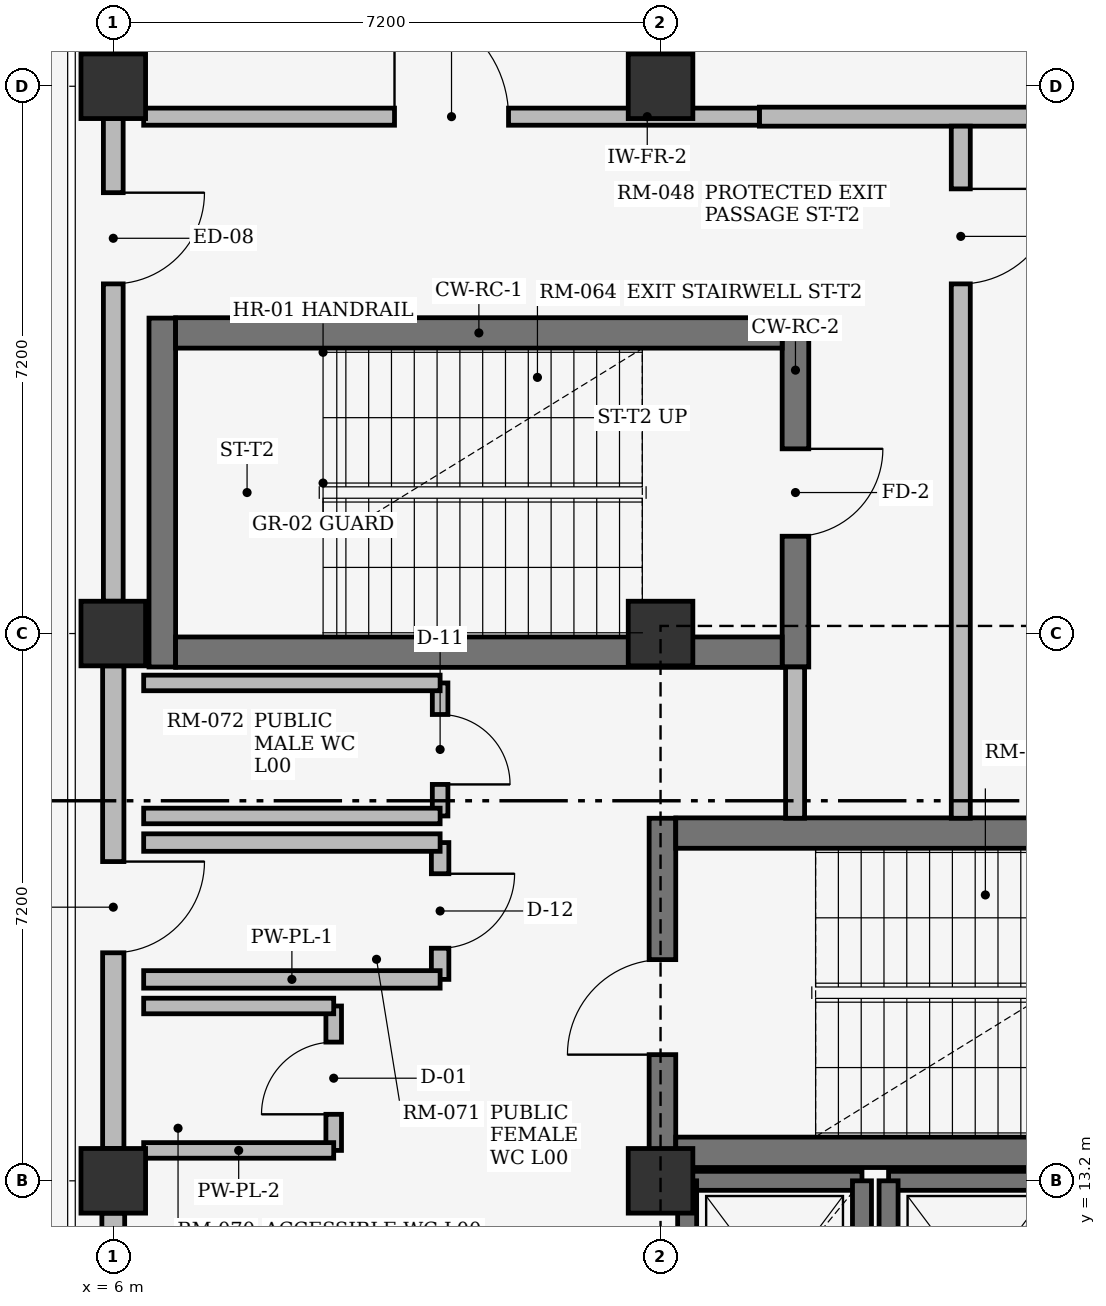
"""IFC4 building model, lengths in metres.
Left out: names, types, materials, properties, quantities, classifications, styles, units other than length and angle.
Written with IfcOpenShell. Run it as: python <this file> out.ifc"""

import sys

from ifc_helpers import new_model, si_unit, direction, frame, frame_2d, origin, origin_2d, place, context, subcontext, project, spatial, rectangle, extrude, element, fill, save


model = new_model("IFC4")
c1 = context("Model", 3, precision=1e-05, world=origin(), true_north=direction((0.0, 1.0)))
c2 = subcontext(c1, "Body", "Model", "MODEL_VIEW")
j1 = project(units=[si_unit("LENGTHUNIT", "METRE"), si_unit("PLANEANGLEUNIT", "RADIAN")], contexts=[c1])
p1 = place(None, origin())
s1 = spatial("IfcSite", under=j1, at=p1, CompositionType="ELEMENT")
p2 = place(p1, origin())
s2 = spatial("IfcBuilding", under=s1, at=p2, CompositionType="ELEMENT")
p3 = place(p2, origin())
s3 = spatial("IfcBuildingStorey", under=s2, at=p3, CompositionType="ELEMENT", Elevation=0.0)
for number, where, z_axis, x_axis in (
    (1, (6.0, 13.2, 0.0), (0.0, 0.0, 1.0), (1.0, 0.0, 0.0)),
    (2, (6.0, 20.4, 0.0), (0.0, 0.0, 1.0), (1.0, 0.0, 0.0)),
    (3, (6.0, 27.6, 0.0), (0.0, 0.0, 1.0), (1.0, 0.0, 0.0)),
    (4, (13.2, 13.2, 0.0), (0.0, 0.0, 1.0), (1.0, 0.0, 0.0)),
    (5, (13.2, 20.4, 0.0), (0.0, 0.0, 1.0), (1.0, 0.0, 0.0)),
    (6, (13.2, 27.6, 0.0), (0.0, 0.0, 1.0), (1.0, 0.0, 0.0)),
):
    element("IfcColumn", number, at=place(p3, frame(where, z_axis=z_axis, x_axis=x_axis)), inside=s3, PredefinedType="COLUMN", context=c2, shape_type="SweptSolid", body=[
        extrude(rectangle(XDim=0.85, YDim=0.85, at=origin_2d()), origin(), (0.0, 0.0, 1.0), 4.48),
    ])
p4 = place(p3, frame((6.0, 6.425, 0.0), z_axis=(0.0, 0.0, 1.0), x_axis=(0.0, 1.0, 0.0)))
e7 = element("IfcWall", 7, at=p4, inside=s3, PredefinedType="STANDARD", context=c2, shape_type="SweptSolid", body=[
    extrude(rectangle(XDim=6.35, YDim=0.3, at=frame_2d((3.175, 0.0))), origin(), (0.0, 0.0, 1.0), 3.66),
])
p5 = place(p4, frame((2.6, 0.0, 0.75)))
e8 = element("IfcOpeningElement", 8, at=p5, cuts=e7, PredefinedType="OPENING", context=c2, shape_type="SweptSolid", body=[
    extrude(rectangle(XDim=1.15, YDim=1.5, at=frame_2d((0.575, 0.75))), frame((0.0, 0.16, 0.0), z_axis=(0.0, -1.0, 0.0), x_axis=(1.0, 0.0, 0.0)), (0.0, 0.0, 1.0), 0.32),
])
p6 = place(p3, frame((6.0, 13.625, 0.0), z_axis=(0.0, 0.0, 1.0), x_axis=(0.0, 1.0, 0.0)))
e9 = element("IfcWall", 9, at=p6, inside=s3, PredefinedType="STANDARD", context=c2, shape_type="SweptSolid", body=[
    extrude(rectangle(XDim=6.35, YDim=0.28, at=frame_2d((3.175, 0.0))), origin(), (0.0, 0.0, 1.0), 3.66),
])
p7 = place(p6, frame((2.575, 0.0, 0.0)))
e10 = element("IfcOpeningElement", 10, at=p7, cuts=e9, PredefinedType="OPENING", context=c2, shape_type="SweptSolid", body=[
    extrude(rectangle(XDim=1.2, YDim=2.15, at=frame_2d((0.6, 1.075))), frame((0.0, 0.15, 0.0), z_axis=(0.0, -1.0, 0.0), x_axis=(1.0, 0.0, 0.0)), (0.0, 0.0, 1.0), 0.3),
])
p8 = place(p3, frame((6.0, 20.825, 0.0), z_axis=(0.0, 0.0, 1.0), x_axis=(0.0, 1.0, 0.0)))
e11 = element("IfcWall", 11, at=p8, inside=s3, PredefinedType="STANDARD", context=c2, shape_type="SweptSolid", body=[
    extrude(rectangle(XDim=6.35, YDim=0.26, at=frame_2d((3.175, 0.0))), origin(), (0.0, 0.0, 1.0), 3.66),
])
p9 = place(p8, frame((4.175, 0.0, 0.0)))
e12 = element("IfcOpeningElement", 12, at=p9, cuts=e11, PredefinedType="OPENING", context=c2, shape_type="SweptSolid", body=[
    extrude(rectangle(XDim=1.2, YDim=2.15, at=frame_2d((0.6, 1.075))), frame((0.0, 0.14, 0.0), z_axis=(0.0, -1.0, 0.0), x_axis=(1.0, 0.0, 0.0)), (0.0, 0.0, 1.0), 0.28),
])
p10 = place(p3, frame((6.0, 28.025, 0.0), z_axis=(0.0, 0.0, 1.0), x_axis=(0.0, 1.0, 0.0)))
e13 = element("IfcWall", 13, at=p10, inside=s3, PredefinedType="STANDARD", context=c2, shape_type="SweptSolid", body=[
    extrude(rectangle(XDim=6.35, YDim=0.36, at=frame_2d((3.175, 0.0))), origin(), (0.0, 0.0, 1.0), 3.66),
])
p11 = place(p10, frame((2.2, 0.0, 0.75)))
e14 = element("IfcOpeningElement", 14, at=p11, cuts=e13, PredefinedType="OPENING", context=c2, shape_type="SweptSolid", body=[
    extrude(rectangle(XDim=1.95, YDim=1.5, at=frame_2d((0.975, 0.75))), frame((0.0, 0.19, 0.0), z_axis=(0.0, -1.0, 0.0), x_axis=(1.0, 0.0, 0.0)), (0.0, 0.0, 1.0), 0.38),
])
p12 = place(p3, frame((13.225, 13.0, 0.0), z_axis=(0.0, 0.0, 1.0), x_axis=(0.0, 1.0, 0.0)))
e15 = element("IfcWall", 15, at=p12, inside=s3, PredefinedType="SHEAR", context=c2, shape_type="SweptSolid", body=[
    extrude(rectangle(XDim=4.97, YDim=0.35, at=frame_2d((2.485, 0.0))), origin(), (0.0, 0.0, 1.0), 4.48),
])
p13 = place(p12, frame((1.86, 0.0, 0.0)))
e16 = element("IfcOpeningElement", 16, at=p13, cuts=e15, PredefinedType="OPENING", context=c2, shape_type="SweptSolid", body=[
    extrude(rectangle(XDim=1.25, YDim=2.2, at=frame_2d((0.625, 1.1))), frame((0.0, 0.185, 0.0), z_axis=(0.0, -1.0, 0.0), x_axis=(1.0, 0.0, 0.0)), (0.0, 0.0, 1.0), 0.37),
])
for number, where, z_axis, x_axis in (
    (17, (13.4, 13.575, 0.0), (0.0, 0.0, 1.0), (1.0, 0.0, 0.0)),
    (18, (13.4, 17.775, 0.0), (0.0, 0.0, 1.0), (1.0, 0.0, 0.0)),
):
    element("IfcWall", number, at=place(p3, frame(where, z_axis=z_axis, x_axis=x_axis)), inside=s3, PredefinedType="SHEAR", context=c2, shape_type="SweptSolid", body=[
        extrude(rectangle(XDim=7.98, YDim=0.4, at=frame_2d((3.99, 0.0))), origin(), (0.0, 0.0, 1.0), 4.48),
    ])
p14 = place(p3, frame((14.975, 24.55, 0.0), z_axis=(0.0, 0.0, 1.0), x_axis=(0.0, -1.0, 0.0)))
e19 = element("IfcWall", 19, at=p14, inside=s3, PredefinedType="SHEAR", context=c2, shape_type="SweptSolid", body=[
    extrude(rectangle(XDim=4.59, YDim=0.35, at=frame_2d((2.295, 0.0))), origin(), (0.0, 0.0, 1.0), 4.48),
])
p15 = place(p14, frame((1.72, 0.0, 0.0)))
e20 = element("IfcOpeningElement", 20, at=p15, cuts=e19, PredefinedType="OPENING", context=c2, shape_type="SweptSolid", body=[
    extrude(rectangle(XDim=1.15, YDim=2.2, at=frame_2d((0.575, 1.1))), frame((0.0, 0.185, 0.0), z_axis=(0.0, -1.0, 0.0), x_axis=(1.0, 0.0, 0.0)), (0.0, 0.0, 1.0), 0.37),
])
p16 = place(p3, frame((6.645, 24.55, 0.0), z_axis=(0.0, 0.0, 1.0), x_axis=(0.0, -1.0, 0.0)))
e21 = element("IfcWall", 21, at=p16, inside=s3, PredefinedType="SHEAR", context=c2, shape_type="SweptSolid", body=[
    extrude(rectangle(XDim=4.59, YDim=0.35, at=frame_2d((2.295, 0.0))), origin(), (0.0, 0.0, 1.0), 4.48),
])
for number, where, z_axis, x_axis in (
    (22, (14.8, 24.355, 0.0), (0.0, 0.0, 1.0), (-1.0, 0.0, 0.0)),
    (23, (14.8, 20.155, 0.0), (0.0, 0.0, 1.0), (-1.0, 0.0, 0.0)),
):
    element("IfcWall", number, at=place(p3, frame(where, z_axis=z_axis, x_axis=x_axis)), inside=s3, PredefinedType="SHEAR", context=c2, shape_type="SweptSolid", body=[
        extrude(rectangle(XDim=7.98, YDim=0.4, at=frame_2d((3.99, 0.0))), origin(), (0.0, 0.0, 1.0), 4.48),
    ])
p17 = place(p3, frame((13.55, 13.2, 0.0), z_axis=(0.0, 0.0, 1.0), x_axis=(1.0, 0.0, 0.0)))
e24 = element("IfcWall", 24, at=p17, inside=s3, PredefinedType="SHEAR", context=c2, shape_type="SweptSolid", body=[
    extrude(rectangle(XDim=2.3, YDim=0.25, at=frame_2d((1.15, 0.0))), origin(), (0.0, 0.0, 1.0), 4.48),
])
for number, where, z_axis, x_axis in (
    (25, (13.55, 10.4, 0.0), (0.0, 0.0, 1.0), (0.0, 1.0, 0.0)),
    (26, (15.85, 10.4, 0.0), (0.0, 0.0, 1.0), (0.0, 1.0, 0.0)),
):
    element("IfcWall", number, at=place(p3, frame(where, z_axis=z_axis, x_axis=x_axis)), inside=s3, PredefinedType="SHEAR", context=c2, shape_type="SweptSolid", body=[
        extrude(rectangle(XDim=2.8, YDim=0.25, at=frame_2d((1.4, 0.0))), origin(), (0.0, 0.0, 1.0), 4.48),
    ])
p18 = place(p3, frame((16.2, 13.2, 0.0), z_axis=(0.0, 0.0, 1.0), x_axis=(1.0, 0.0, 0.0)))
e27 = element("IfcWall", 27, at=p18, inside=s3, PredefinedType="SHEAR", context=c2, shape_type="SweptSolid", body=[
    extrude(rectangle(XDim=2.3, YDim=0.25, at=frame_2d((1.15, 0.0))), origin(), (0.0, 0.0, 1.0), 4.48),
])
p19 = place(p3, frame((16.2, 10.4, 0.0), z_axis=(0.0, 0.0, 1.0), x_axis=(0.0, 1.0, 0.0)))
e28 = element("IfcWall", 28, at=p19, inside=s3, PredefinedType="SHEAR", context=c2, shape_type="SweptSolid", body=[
    extrude(rectangle(XDim=2.8, YDim=0.25, at=frame_2d((1.4, 0.0))), origin(), (0.0, 0.0, 1.0), 4.48),
])
p20 = place(p3, frame((8.9, 13.6, 0.0), z_axis=(0.0, 0.0, 1.0), x_axis=(0.0, 1.0, 0.0)))
e29 = element("IfcWall", 29, at=p20, inside=s3, PredefinedType="PLUMBINGWALL", context=c2, shape_type="SweptSolid", body=[
    extrude(rectangle(XDim=1.9, YDim=0.205, at=frame_2d((0.95, 0.0))), origin(), (0.0, 0.0, 1.0), 4.46),
])
p21 = place(p20, frame((0.475, 0.0, 0.0)))
e30 = element("IfcOpeningElement", 30, at=p21, cuts=e29, PredefinedType="OPENING", context=c2, shape_type="SweptSolid", body=[
    extrude(rectangle(XDim=0.95, YDim=2.15, at=frame_2d((0.475, 1.075))), frame((0.0, 0.113, 0.0), z_axis=(0.0, -1.0, 0.0), x_axis=(1.0, 0.0, 0.0)), (0.0, 0.0, 1.0), 0.225),
])
for number, where, z_axis, x_axis in (
    (31, (6.4, 13.6, 0.0), (0.0, 0.0, 1.0), (1.0, 0.0, 0.0)),
    (32, (6.4, 15.5, 0.0), (0.0, 0.0, 1.0), (1.0, 0.0, 0.0)),
):
    element("IfcWall", number, at=place(p3, frame(where, z_axis=z_axis, x_axis=x_axis)), inside=s3, PredefinedType="PLUMBINGWALL", context=c2, shape_type="SweptSolid", body=[
        extrude(rectangle(XDim=2.5, YDim=0.205, at=frame_2d((1.25, 0.0))), origin(), (0.0, 0.0, 1.0), 4.46),
    ])
p22 = place(p3, frame((10.3, 15.85, 0.0), z_axis=(0.0, 0.0, 1.0), x_axis=(0.0, 1.0, 0.0)))
e33 = element("IfcWall", 33, at=p22, inside=s3, PredefinedType="PLUMBINGWALL", context=c2, shape_type="SweptSolid", body=[
    extrude(rectangle(XDim=1.8, YDim=0.23, at=frame_2d((0.9, 0.0))), origin(), (0.0, 0.0, 1.0), 4.46),
])
p23 = place(p22, frame((0.41, 0.0, 0.0)))
e34 = element("IfcOpeningElement", 34, at=p23, cuts=e33, PredefinedType="OPENING", context=c2, shape_type="SweptSolid", body=[
    extrude(rectangle(XDim=0.98, YDim=2.1, at=frame_2d((0.49, 1.05))), frame((0.0, 0.125, 0.0), z_axis=(0.0, -1.0, 0.0), x_axis=(1.0, 0.0, 0.0)), (0.0, 0.0, 1.0), 0.25),
])
for number, where, z_axis, x_axis in (
    (35, (6.4, 15.85, 0.0), (0.0, 0.0, 1.0), (1.0, 0.0, 0.0)),
    (36, (6.4, 17.65, 0.0), (0.0, 0.0, 1.0), (1.0, 0.0, 0.0)),
):
    element("IfcWall", number, at=place(p3, frame(where, z_axis=z_axis, x_axis=x_axis)), inside=s3, PredefinedType="PLUMBINGWALL", context=c2, shape_type="SweptSolid", body=[
        extrude(rectangle(XDim=3.9, YDim=0.23, at=frame_2d((1.95, 0.0))), origin(), (0.0, 0.0, 1.0), 4.46),
    ])
p24 = place(p3, frame((10.3, 18.0, 0.0), z_axis=(0.0, 0.0, 1.0), x_axis=(0.0, 1.0, 0.0)))
e37 = element("IfcWall", 37, at=p24, inside=s3, PredefinedType="PLUMBINGWALL", context=c2, shape_type="SweptSolid", body=[
    extrude(rectangle(XDim=1.75, YDim=0.205, at=frame_2d((0.875, 0.0))), origin(), (0.0, 0.0, 1.0), 4.46),
])
p25 = place(p24, frame((0.415, 0.0, 0.0)))
e38 = element("IfcOpeningElement", 38, at=p25, cuts=e37, PredefinedType="OPENING", context=c2, shape_type="SweptSolid", body=[
    extrude(rectangle(XDim=0.92, YDim=2.1, at=frame_2d((0.46, 1.05))), frame((0.0, 0.113, 0.0), z_axis=(0.0, -1.0, 0.0), x_axis=(1.0, 0.0, 0.0)), (0.0, 0.0, 1.0), 0.225),
])
for number, where, z_axis, x_axis in (
    (39, (6.4, 18.0, 0.0), (0.0, 0.0, 1.0), (1.0, 0.0, 0.0)),
    (40, (6.4, 19.75, 0.0), (0.0, 0.0, 1.0), (1.0, 0.0, 0.0)),
):
    element("IfcWall", number, at=place(p3, frame(where, z_axis=z_axis, x_axis=x_axis)), inside=s3, PredefinedType="PLUMBINGWALL", context=c2, shape_type="SweptSolid", body=[
        extrude(rectangle(XDim=3.9, YDim=0.205, at=frame_2d((1.95, 0.0))), origin(), (0.0, 0.0, 1.0), 4.46),
    ])
p26 = place(p3, frame((14.5, 27.2, 0.0), z_axis=(0.0, 0.0, 1.0), x_axis=(1.0, 0.0, 0.0)))
e41 = element("IfcWall", 41, at=p26, inside=s3, PredefinedType="SOLIDWALL", context=c2, shape_type="SweptSolid", body=[
    extrude(rectangle(XDim=19.75, YDim=0.25, at=frame_2d((9.875, 0.0))), origin(), (0.0, 0.0, 1.0), 4.46),
])
p27 = place(p26, frame((8.975, 0.0, 0.0)))
e42 = element("IfcOpeningElement", 42, at=p27, cuts=e41, PredefinedType="OPENING", context=c2, shape_type="SweptSolid", body=[
    extrude(rectangle(XDim=1.8, YDim=2.25, at=frame_2d((0.9, 1.125))), frame((0.0, 0.135, 0.0), z_axis=(0.0, -1.0, 0.0), x_axis=(1.0, 0.0, 0.0)), (0.0, 0.0, 1.0), 0.27),
])
p28 = place(p3, frame((6.4, 27.2, 0.0), z_axis=(0.0, 0.0, 1.0), x_axis=(1.0, 0.0, 0.0)))
e43 = element("IfcWall", 43, at=p28, inside=s3, PredefinedType="SOLIDWALL", context=c2, shape_type="SweptSolid", body=[
    extrude(rectangle(XDim=8.1, YDim=0.225, at=frame_2d((4.05, 0.0))), origin(), (0.0, 0.0, 1.0), 4.46),
])
p29 = place(p28, frame((3.3, 0.0, 0.0)))
e44 = element("IfcOpeningElement", 44, at=p29, cuts=e43, PredefinedType="OPENING", context=c2, shape_type="SweptSolid", body=[
    extrude(rectangle(XDim=1.5, YDim=2.2, at=frame_2d((0.75, 1.1))), frame((0.0, 0.123, 0.0), z_axis=(0.0, -1.0, 0.0), x_axis=(1.0, 0.0, 0.0)), (0.0, 0.0, 1.0), 0.245),
])
p30 = place(p3, frame((17.15, 17.97, 0.0), z_axis=(0.0, 0.0, 1.0), x_axis=(0.0, 1.0, 0.0)))
e45 = element("IfcWall", 45, at=p30, inside=s3, PredefinedType="SOLIDWALL", context=c2, shape_type="SweptSolid", body=[
    extrude(rectangle(XDim=9.105, YDim=0.25, at=frame_2d((4.552, 0.0))), origin(), (0.0, 0.0, 1.0), 4.46),
])
p31 = place(p30, frame((7.03, 0.0, 0.0)))
e46 = element("IfcOpeningElement", 46, at=p31, cuts=e45, PredefinedType="OPENING", context=c2, shape_type="SweptSolid", body=[
    extrude(rectangle(XDim=1.25, YDim=2.2, at=frame_2d((0.625, 1.1))), frame((0.0, 0.135, 0.0), z_axis=(0.0, -1.0, 0.0), x_axis=(1.0, 0.0, 0.0)), (0.0, 0.0, 1.0), 0.27),
])
p32 = place(p3, frame((14.97, 17.97, 0.0), z_axis=(0.0, 0.0, 1.0), x_axis=(0.0, 1.0, 0.0)))
e47 = element("IfcWall", 47, at=p32, inside=s3, PredefinedType="SOLIDWALL", context=c2, shape_type="SweptSolid", body=[
    extrude(rectangle(XDim=1.99, YDim=0.25, at=frame_2d((0.995, 0.0))), origin(), (0.0, 0.0, 1.0), 4.46),
])
p33 = place(p7, origin())
e48 = element("IfcDoor", 48, at=p33, inside=s3, OperationType="SINGLE_SWING_RIGHT", PredefinedType="DOOR", context=c2, shape_type="SweptSolid", body=[
    extrude(rectangle(XDim=1.2, YDim=2.15, at=frame_2d((0.6, 1.075))), frame((0.0, 0.025, 0.0), z_axis=(0.0, -1.0, 0.0), x_axis=(1.0, 0.0, 0.0)), (0.0, 0.0, 1.0), 0.05),
])
fill(e10, e48)
p34 = place(p9, origin())
e49 = element("IfcDoor", 49, at=p34, inside=s3, OperationType="SINGLE_SWING_RIGHT", PredefinedType="DOOR", context=c2, shape_type="SweptSolid", body=[
    extrude(rectangle(XDim=1.2, YDim=2.15, at=frame_2d((0.6, 1.075))), frame((0.0, 0.025, 0.0), z_axis=(0.0, -1.0, 0.0), x_axis=(1.0, 0.0, 0.0)), (0.0, 0.0, 1.0), 0.05),
])
fill(e12, e49)
p35 = place(p13, origin())
e50 = element("IfcDoor", 50, at=p35, inside=s3, OperationType="SINGLE_SWING_LEFT", PredefinedType="DOOR", context=c2, shape_type="SweptSolid", body=[
    extrude(rectangle(XDim=1.25, YDim=2.2, at=frame_2d((0.625, 1.1))), frame((0.0, 0.025, 0.0), z_axis=(0.0, -1.0, 0.0), x_axis=(1.0, 0.0, 0.0)), (0.0, 0.0, 1.0), 0.05),
])
fill(e16, e50)
p36 = place(p15, origin())
e51 = element("IfcDoor", 51, at=p36, inside=s3, OperationType="SINGLE_SWING_LEFT", PredefinedType="DOOR", context=c2, shape_type="SweptSolid", body=[
    extrude(rectangle(XDim=1.15, YDim=2.2, at=frame_2d((0.575, 1.1))), frame((0.0, 0.025, 0.0), z_axis=(0.0, -1.0, 0.0), x_axis=(1.0, 0.0, 0.0)), (0.0, 0.0, 1.0), 0.05),
])
fill(e20, e51)
p37 = place(p21, origin())
e52 = element("IfcDoor", 52, at=p37, inside=s3, OperationType="SINGLE_SWING_LEFT", PredefinedType="DOOR", context=c2, shape_type="SweptSolid", body=[
    extrude(rectangle(XDim=0.95, YDim=2.15, at=frame_2d((0.475, 1.075))), frame((0.0, 0.025, 0.0), z_axis=(0.0, -1.0, 0.0), x_axis=(1.0, 0.0, 0.0)), (0.0, 0.0, 1.0), 0.05),
])
fill(e30, e52)
p38 = place(p23, origin())
e53 = element("IfcDoor", 53, at=p38, inside=s3, OperationType="SINGLE_SWING_RIGHT", PredefinedType="DOOR", context=c2, shape_type="SweptSolid", body=[
    extrude(rectangle(XDim=0.98, YDim=2.1, at=frame_2d((0.49, 1.05))), frame((0.0, 0.025, 0.0), z_axis=(0.0, -1.0, 0.0), x_axis=(1.0, 0.0, 0.0)), (0.0, 0.0, 1.0), 0.05),
])
fill(e34, e53)
p39 = place(p25, frame((0.92, 0.0, 0.0), z_axis=(0.0, 0.0, 1.0), x_axis=(-1.0, 0.0, 0.0)))
e54 = element("IfcDoor", 54, at=p39, inside=s3, OperationType="SINGLE_SWING_LEFT", PredefinedType="DOOR", context=c2, shape_type="SweptSolid", body=[
    extrude(rectangle(XDim=0.92, YDim=2.1, at=frame_2d((0.46, 1.05))), frame((0.0, 0.025, 0.0), z_axis=(0.0, -1.0, 0.0), x_axis=(1.0, 0.0, 0.0)), (0.0, 0.0, 1.0), 0.05),
])
fill(e38, e54)
p40 = place(p29, origin())
e55 = element("IfcDoor", 55, at=p40, inside=s3, OperationType="SINGLE_SWING_LEFT", PredefinedType="DOOR", context=c2, shape_type="SweptSolid", body=[
    extrude(rectangle(XDim=1.5, YDim=2.2, at=frame_2d((0.75, 1.1))), frame((0.0, 0.025, 0.0), z_axis=(0.0, -1.0, 0.0), x_axis=(1.0, 0.0, 0.0)), (0.0, 0.0, 1.0), 0.05),
])
fill(e44, e55)
p41 = place(p31, origin())
e56 = element("IfcDoor", 56, at=p41, inside=s3, OperationType="SINGLE_SWING_RIGHT", PredefinedType="DOOR", context=c2, shape_type="SweptSolid", body=[
    extrude(rectangle(XDim=1.25, YDim=2.2, at=frame_2d((0.625, 1.1))), frame((0.0, 0.025, 0.0), z_axis=(0.0, -1.0, 0.0), x_axis=(1.0, 0.0, 0.0)), (0.0, 0.0, 1.0), 0.05),
])
fill(e46, e56)
save(model, sys.argv[1])
